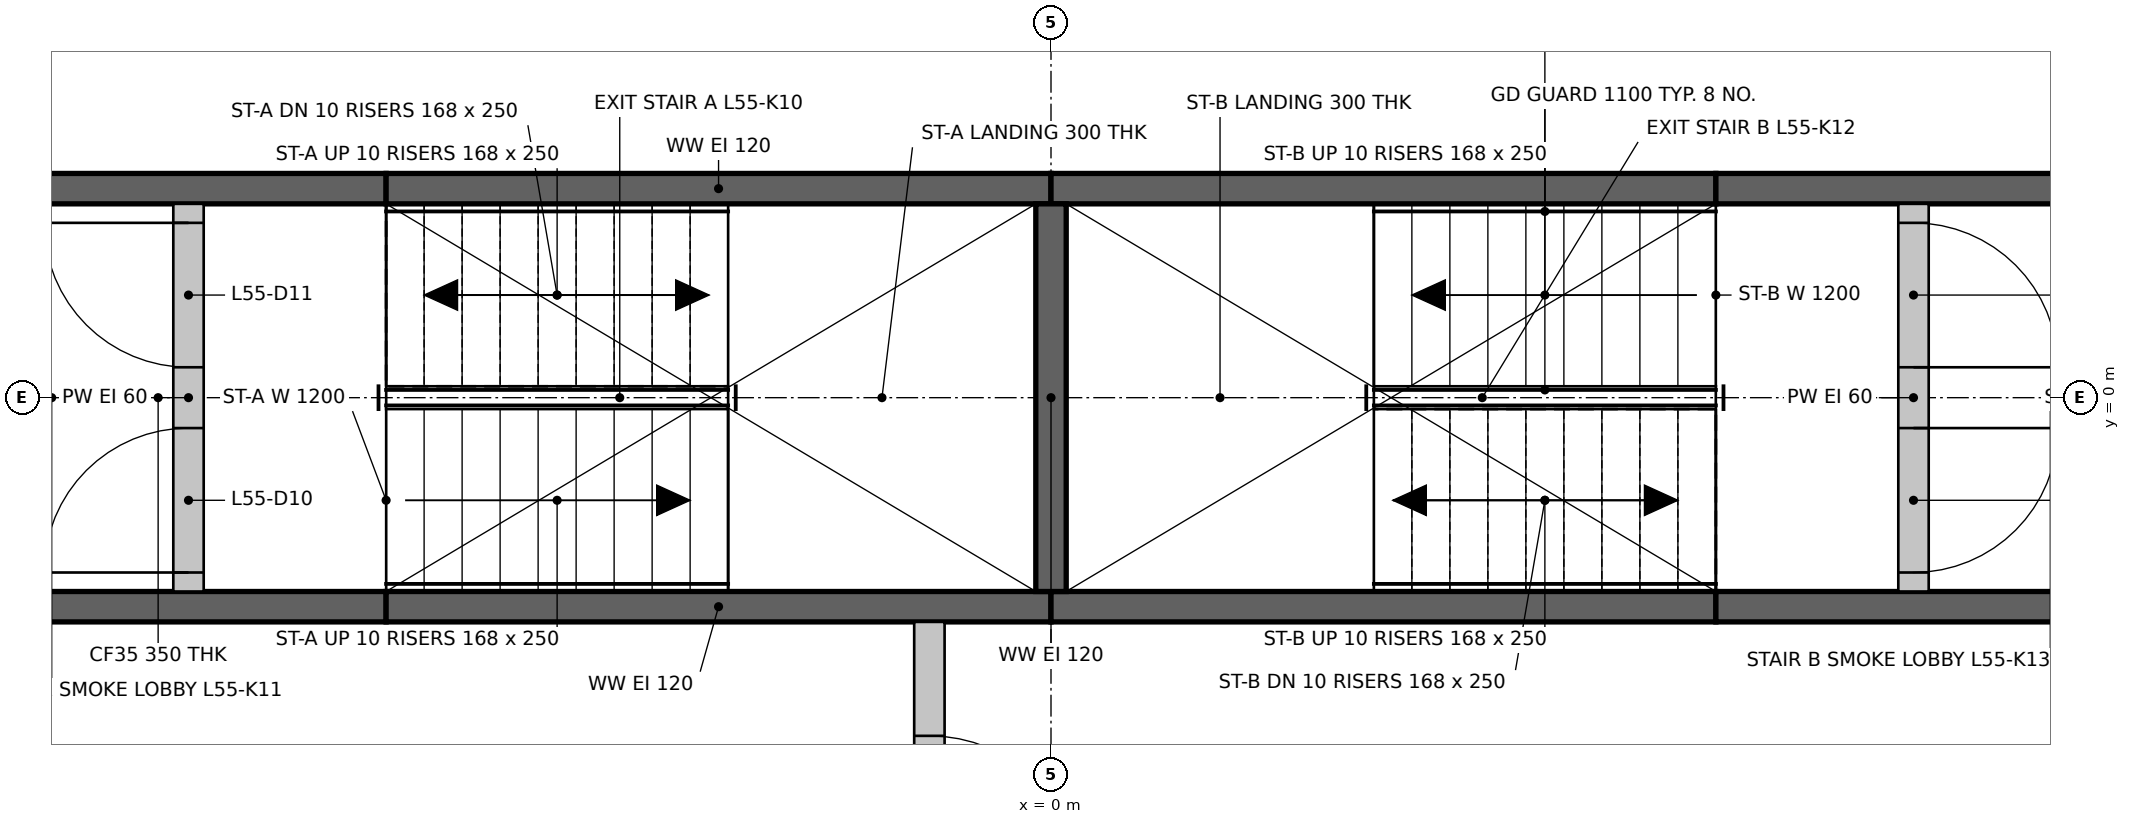
"""IFC4 building model, lengths in metres.
Left out: names, types, materials, properties, quantities, classifications, styles, units other than length and angle.
Written with IfcOpenShell. Run it as: python <this file> out.ifc"""

import sys

from ifc_helpers import new_model, si_unit, direction, frame, frame_2d, origin, place, context, subcontext, project, spatial, rectangle, extrude, element, fill, save


model = new_model("IFC4")
c1 = context("Model", 3, precision=1e-05, world=origin(), true_north=direction((0.0, 1.0)))
c2 = subcontext(c1, "Body", "Model", "MODEL_VIEW")
j1 = project(units=[si_unit("LENGTHUNIT", "METRE"), si_unit("PLANEANGLEUNIT", "RADIAN")], contexts=[c1])
p1 = place(None, origin())
s1 = spatial("IfcSite", under=j1, at=p1, CompositionType="ELEMENT")
p2 = place(p1, origin())
s2 = spatial("IfcBuilding", under=s1, at=p2, CompositionType="ELEMENT")
p3 = place(p2, frame((0.0, 0.0, 204.4)))
s3 = spatial("IfcBuildingStorey", under=s2, at=p3, CompositionType="ELEMENT", Elevation=204.4)
p4 = place(p3, frame((-7.374, -1.375, 0.0), z_axis=(0.0, 0.0, 1.0), x_axis=(1.0, 0.0, 0.0)))
e1 = element("IfcWall", 1, at=p4, inside=s3, PredefinedType="SHEAR", context=c2, shape_type="SweptSolid", body=[
    extrude(rectangle(XDim=3.0, YDim=0.2, at=frame_2d((1.5, 0.0))), origin(), (0.0, 0.0, 1.0), 3.0),
])
for number, where, z_axis, x_axis in (
    (2, (-4.374, -1.375, 0.0), (0.0, 0.0, 1.0), (1.0, 0.0, 0.0)),
    (3, (0.0, -1.375, 0.0), (0.0, 0.0, 1.0), (1.0, 0.0, 0.0)),
):
    element("IfcWall", number, at=place(p3, frame(where, z_axis=z_axis, x_axis=x_axis)), inside=s3, PredefinedType="SHEAR", context=c2, shape_type="SweptSolid", body=[
        extrude(rectangle(XDim=4.374, YDim=0.2, at=frame_2d((2.187, 0.0))), origin(), (0.0, 0.0, 1.0), 3.0),
    ])
for number, where, z_axis, x_axis in (
    (4, (4.374, -1.375, 0.0), (0.0, 0.0, 1.0), (1.0, 0.0, 0.0)),
    (5, (-7.374, 1.375, 0.0), (0.0, 0.0, 1.0), (1.0, 0.0, 0.0)),
):
    element("IfcWall", number, at=place(p3, frame(where, z_axis=z_axis, x_axis=x_axis)), inside=s3, PredefinedType="SHEAR", context=c2, shape_type="SweptSolid", body=[
        extrude(rectangle(XDim=3.0, YDim=0.2, at=frame_2d((1.5, 0.0))), origin(), (0.0, 0.0, 1.0), 3.0),
    ])
for number, where, z_axis, x_axis in (
    (6, (-4.374, 1.375, 0.0), (0.0, 0.0, 1.0), (1.0, 0.0, 0.0)),
    (7, (0.0, 1.375, 0.0), (0.0, 0.0, 1.0), (1.0, 0.0, 0.0)),
):
    element("IfcWall", number, at=place(p3, frame(where, z_axis=z_axis, x_axis=x_axis)), inside=s3, PredefinedType="SHEAR", context=c2, shape_type="SweptSolid", body=[
        extrude(rectangle(XDim=4.374, YDim=0.2, at=frame_2d((2.187, 0.0))), origin(), (0.0, 0.0, 1.0), 3.0),
    ])
p5 = place(p3, frame((4.374, 1.375, 0.0), z_axis=(0.0, 0.0, 1.0), x_axis=(1.0, 0.0, 0.0)))
e8 = element("IfcWall", 8, at=p5, inside=s3, PredefinedType="SHEAR", context=c2, shape_type="SweptSolid", body=[
    extrude(rectangle(XDim=3.0, YDim=0.2, at=frame_2d((1.5, 0.0))), origin(), (0.0, 0.0, 1.0), 3.0),
])
p6 = place(p3, frame((0.0, -1.275, 0.0), z_axis=(0.0, 0.0, 1.0), x_axis=(0.0, 1.0, 0.0)))
e9 = element("IfcWall", 9, at=p6, inside=s3, PredefinedType="SHEAR", context=c2, shape_type="SweptSolid", body=[
    extrude(rectangle(XDim=2.55, YDim=0.2, at=frame_2d((1.275, 0.0))), origin(), (0.0, 0.0, 1.0), 3.0),
])
p7 = place(p3, frame((-0.8, -3.974, 0.0), z_axis=(0.0, 0.0, 1.0), x_axis=(0.0, 1.0, 0.0)))
e10 = element("IfcWall", 10, at=p7, inside=s3, PredefinedType="PARTITIONING", context=c2, shape_type="SweptSolid", body=[
    extrude(rectangle(XDim=2.499, YDim=0.2, at=frame_2d((1.25, 0.0))), origin(), (0.0, 0.0, 1.0), 3.0),
])
p8 = place(p7, frame((0.75, 0.0, 0.0)))
e11 = element("IfcOpeningElement", 11, at=p8, cuts=e10, PredefinedType="OPENING", context=c2, shape_type="SweptSolid", body=[
    extrude(rectangle(XDim=1.0, YDim=2.1, at=frame_2d((0.5, 1.05))), frame((0.0, 0.11, 0.0), z_axis=(0.0, -1.0, 0.0), x_axis=(1.0, 0.0, 0.0)), (0.0, 0.0, 1.0), 0.22),
])
p9 = place(p3, frame((-5.674, -1.275, 0.0), z_axis=(0.0, 0.0, 1.0), x_axis=(0.0, 1.0, 0.0)))
e12 = element("IfcWall", 12, at=p9, inside=s3, PredefinedType="PARTITIONING", context=c2, shape_type="SweptSolid", body=[
    extrude(rectangle(XDim=2.55, YDim=0.2, at=frame_2d((1.275, 0.0))), origin(), (0.0, 0.0, 1.0), 3.0),
])
p10 = place(p9, frame((0.125, 0.0, 0.0)))
e13 = element("IfcOpeningElement", 13, at=p10, cuts=e12, PredefinedType="OPENING", context=c2, shape_type="SweptSolid", body=[
    extrude(rectangle(XDim=0.95, YDim=2.1, at=frame_2d((0.475, 1.05))), frame((0.0, 0.11, 0.0), z_axis=(0.0, -1.0, 0.0), x_axis=(1.0, 0.0, 0.0)), (0.0, 0.0, 1.0), 0.22),
])
p11 = place(p9, frame((1.475, 0.0, 0.0)))
e14 = element("IfcOpeningElement", 14, at=p11, cuts=e12, PredefinedType="OPENING", context=c2, shape_type="SweptSolid", body=[
    extrude(rectangle(XDim=0.95, YDim=2.1, at=frame_2d((0.475, 1.05))), frame((0.0, 0.11, 0.0), z_axis=(0.0, -1.0, 0.0), x_axis=(1.0, 0.0, 0.0)), (0.0, 0.0, 1.0), 0.22),
])
p12 = place(p3, frame((5.674, -1.275, 0.0), z_axis=(0.0, 0.0, 1.0), x_axis=(0.0, 1.0, 0.0)))
e15 = element("IfcWall", 15, at=p12, inside=s3, PredefinedType="PARTITIONING", context=c2, shape_type="SweptSolid", body=[
    extrude(rectangle(XDim=2.55, YDim=0.2, at=frame_2d((1.275, 0.0))), origin(), (0.0, 0.0, 1.0), 3.0),
])
p13 = place(p12, frame((0.125, 0.0, 0.0)))
e16 = element("IfcOpeningElement", 16, at=p13, cuts=e15, PredefinedType="OPENING", context=c2, shape_type="SweptSolid", body=[
    extrude(rectangle(XDim=0.95, YDim=2.1, at=frame_2d((0.475, 1.05))), frame((0.0, 0.11, 0.0), z_axis=(0.0, -1.0, 0.0), x_axis=(1.0, 0.0, 0.0)), (0.0, 0.0, 1.0), 0.22),
])
p14 = place(p12, frame((1.475, 0.0, 0.0)))
e17 = element("IfcOpeningElement", 17, at=p14, cuts=e15, PredefinedType="OPENING", context=c2, shape_type="SweptSolid", body=[
    extrude(rectangle(XDim=0.95, YDim=2.1, at=frame_2d((0.475, 1.05))), frame((0.0, 0.11, 0.0), z_axis=(0.0, -1.0, 0.0), x_axis=(1.0, 0.0, 0.0)), (0.0, 0.0, 1.0), 0.22),
])
p15 = place(p10, origin())
e18 = element("IfcDoor", 18, at=p15, inside=s3, OperationType="SINGLE_SWING_LEFT", PredefinedType="DOOR", context=c2, shape_type="SweptSolid", body=[
    extrude(rectangle(XDim=0.95, YDim=2.1, at=frame_2d((0.475, 1.05))), frame((0.0, 0.025, 0.0), z_axis=(0.0, -1.0, 0.0), x_axis=(1.0, 0.0, 0.0)), (0.0, 0.0, 1.0), 0.05),
])
fill(e13, e18)
p16 = place(p11, origin())
e19 = element("IfcDoor", 19, at=p16, inside=s3, OperationType="SINGLE_SWING_RIGHT", PredefinedType="DOOR", context=c2, shape_type="SweptSolid", body=[
    extrude(rectangle(XDim=0.95, YDim=2.1, at=frame_2d((0.475, 1.05))), frame((0.0, 0.025, 0.0), z_axis=(0.0, -1.0, 0.0), x_axis=(1.0, 0.0, 0.0)), (0.0, 0.0, 1.0), 0.05),
])
fill(e14, e19)
p17 = place(p13, frame((0.95, 0.0, 0.0), z_axis=(0.0, 0.0, 1.0), x_axis=(-1.0, 0.0, 0.0)))
e20 = element("IfcDoor", 20, at=p17, inside=s3, OperationType="SINGLE_SWING_RIGHT", PredefinedType="DOOR", context=c2, shape_type="SweptSolid", body=[
    extrude(rectangle(XDim=0.95, YDim=2.1, at=frame_2d((0.475, 1.05))), frame((0.0, 0.025, 0.0), z_axis=(0.0, -1.0, 0.0), x_axis=(1.0, 0.0, 0.0)), (0.0, 0.0, 1.0), 0.05),
])
fill(e16, e20)
p18 = place(p14, frame((0.95, 0.0, 0.0), z_axis=(0.0, 0.0, 1.0), x_axis=(-1.0, 0.0, 0.0)))
e21 = element("IfcDoor", 21, at=p18, inside=s3, OperationType="SINGLE_SWING_LEFT", PredefinedType="DOOR", context=c2, shape_type="SweptSolid", body=[
    extrude(rectangle(XDim=0.95, YDim=2.1, at=frame_2d((0.475, 1.05))), frame((0.0, 0.025, 0.0), z_axis=(0.0, -1.0, 0.0), x_axis=(1.0, 0.0, 0.0)), (0.0, 0.0, 1.0), 0.05),
])
fill(e17, e21)
p19 = place(p8, frame((1.0, 0.0, 0.0), z_axis=(0.0, 0.0, 1.0), x_axis=(-1.0, 0.0, 0.0)))
e22 = element("IfcDoor", 22, at=p19, inside=s3, OperationType="SINGLE_SWING_LEFT", PredefinedType="DOOR", context=c2, shape_type="SweptSolid", body=[
    extrude(rectangle(XDim=1.0, YDim=2.1, at=frame_2d((0.5, 1.05))), frame((0.0, 0.025, 0.0), z_axis=(0.0, -1.0, 0.0), x_axis=(1.0, 0.0, 0.0)), (0.0, 0.0, 1.0), 0.05),
])
fill(e11, e22)
save(model, sys.argv[1])
